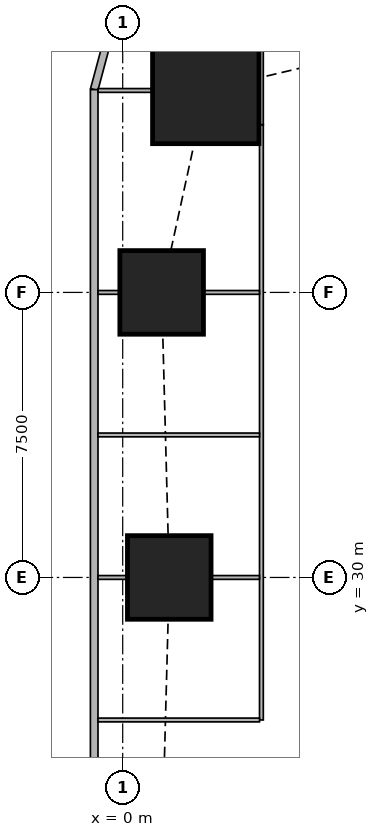
"""IFC4 building model, lengths in metres.
Left out: names, types, materials, properties, quantities, classifications, styles, units other than length and angle.
Written with IfcOpenShell. Run it as: python <this file> out.ifc"""

import sys

from ifc_helpers import new_model, si_unit, direction, frame, frame_2d, origin, origin_2d, place, context, subcontext, project, spatial, rectangle, extrude, element, fill, save


model = new_model("IFC4")
c1 = context("Model", 3, precision=1e-05, world=origin(), true_north=direction((0.0, 1.0)))
c2 = subcontext(c1, "Body", "Model", "MODEL_VIEW")
j1 = project(units=[si_unit("LENGTHUNIT", "METRE"), si_unit("PLANEANGLEUNIT", "RADIAN")], contexts=[c1])
p1 = place(None, origin())
s1 = spatial("IfcSite", under=j1, at=p1, CompositionType="ELEMENT")
p2 = place(p1, origin())
s2 = spatial("IfcBuilding", under=s1, at=p2, CompositionType="ELEMENT")
p3 = place(p2, frame((0.0, 0.0, 111.65)))
s3 = spatial("IfcBuildingStorey", under=s2, at=p3, CompositionType="ELEMENT", Elevation=111.65)
for number, where, z_axis, x_axis in (
    (1, (1.225, 30.0, 0.0), (0.0, 0.0, 1.0), (1.0, 0.0, 0.0)),
    (2, (1.025, 37.5, 0.0), (0.0, 0.0, 1.0), (1.0, 0.0, 0.0)),
):
    element("IfcColumn", number, at=place(p3, frame(where, z_axis=z_axis, x_axis=x_axis)), inside=s3, PredefinedType="COLUMN", context=c2, shape_type="SweptSolid", body=[
        extrude(rectangle(XDim=2.2, YDim=2.2, at=origin_2d()), origin(), (0.0, 0.0, 1.0), 3.75),
    ])
p4 = place(p3, frame((2.186, 42.814, 0.0), z_axis=(0.0, 0.0, 1.0), x_axis=(1.0, 0.0, 0.0)))
e3 = element("IfcColumn", 3, at=p4, inside=s3, PredefinedType="COLUMN", context=c2, shape_type="SweptSolid", body=[
    extrude(rectangle(XDim=2.8, YDim=2.8, at=origin_2d()), origin(), (0.0, 0.0, 1.0), 3.75),
])
p5 = place(p3, frame((-0.358, 44.298, 0.0), z_axis=(0.0, 0.0, 1.0), x_axis=(-0.259168954497, -0.965832000415, 0.0)))
e4 = element("IfcWall", 4, at=p5, inside=s3, PredefinedType="SOLIDWALL", context=c2, shape_type="SweptSolid", body=[
    extrude(rectangle(XDim=1.513, YDim=0.2, at=frame_2d((0.756, 0.0))), origin(), (0.0, 0.0, 1.0), 3.5),
])
p6 = place(p3, frame((-0.75, 42.837, 0.0), z_axis=(0.0, 0.0, 1.0), x_axis=(0.0, -1.0, 0.0)))
e5 = element("IfcWall", 5, at=p6, inside=s3, PredefinedType="SOLIDWALL", context=c2, shape_type="SweptSolid", body=[
    extrude(rectangle(XDim=40.674, YDim=0.2, at=frame_2d((20.337, 0.0))), origin(), (0.0, 0.0, 1.0), 3.5),
])
p7 = place(p6, frame((1.78, 0.0, 0.9)))
e6 = element("IfcOpeningElement", 6, at=p7, cuts=e5, PredefinedType="OPENING", context=c2, shape_type="SweptSolid", body=[
    extrude(rectangle(XDim=1.8, YDim=1.5, at=frame_2d((0.9, 0.75))), frame((0.0, 0.11, 0.0), z_axis=(0.0, -1.0, 0.0), x_axis=(1.0, 0.0, 0.0)), (0.0, 0.0, 1.0), 0.22),
])
p8 = place(p6, frame((6.312, 0.0, 0.9)))
e7 = element("IfcOpeningElement", 7, at=p8, cuts=e5, PredefinedType="OPENING", context=c2, shape_type="SweptSolid", body=[
    extrude(rectangle(XDim=1.8, YDim=1.5, at=frame_2d((0.9, 0.75))), frame((0.0, 0.11, 0.0), z_axis=(0.0, -1.0, 0.0), x_axis=(1.0, 0.0, 0.0)), (0.0, 0.0, 1.0), 0.22),
])
p9 = place(p6, frame((10.062, 0.0, 0.9)))
e8 = element("IfcOpeningElement", 8, at=p9, cuts=e5, PredefinedType="OPENING", context=c2, shape_type="SweptSolid", body=[
    extrude(rectangle(XDim=1.8, YDim=1.5, at=frame_2d((0.9, 0.75))), frame((0.0, 0.11, 0.0), z_axis=(0.0, -1.0, 0.0), x_axis=(1.0, 0.0, 0.0)), (0.0, 0.0, 1.0), 0.22),
])
p10 = place(p6, frame((13.812, 0.0, 0.9)))
e9 = element("IfcOpeningElement", 9, at=p10, cuts=e5, PredefinedType="OPENING", context=c2, shape_type="SweptSolid", body=[
    extrude(rectangle(XDim=1.8, YDim=1.5, at=frame_2d((0.9, 0.75))), frame((0.0, 0.11, 0.0), z_axis=(0.0, -1.0, 0.0), x_axis=(1.0, 0.0, 0.0)), (0.0, 0.0, 1.0), 0.22),
])
p11 = place(p6, frame((17.562, 0.0, 0.9)))
e10 = element("IfcOpeningElement", 10, at=p11, cuts=e5, PredefinedType="OPENING", context=c2, shape_type="SweptSolid", body=[
    extrude(rectangle(XDim=1.8, YDim=1.5, at=frame_2d((0.9, 0.75))), frame((0.0, 0.11, 0.0), z_axis=(0.0, -1.0, 0.0), x_axis=(1.0, 0.0, 0.0)), (0.0, 0.0, 1.0), 0.22),
])
p12 = place(p6, frame((21.312, 0.0, 0.9)))
e11 = element("IfcOpeningElement", 11, at=p12, cuts=e5, PredefinedType="OPENING", context=c2, shape_type="SweptSolid", body=[
    extrude(rectangle(XDim=1.8, YDim=1.5, at=frame_2d((0.9, 0.75))), frame((0.0, 0.11, 0.0), z_axis=(0.0, -1.0, 0.0), x_axis=(1.0, 0.0, 0.0)), (0.0, 0.0, 1.0), 0.22),
])
p13 = place(p6, frame((25.062, 0.0, 0.9)))
e12 = element("IfcOpeningElement", 12, at=p13, cuts=e5, PredefinedType="OPENING", context=c2, shape_type="SweptSolid", body=[
    extrude(rectangle(XDim=1.8, YDim=1.5, at=frame_2d((0.9, 0.75))), frame((0.0, 0.11, 0.0), z_axis=(0.0, -1.0, 0.0), x_axis=(1.0, 0.0, 0.0)), (0.0, 0.0, 1.0), 0.22),
])
p14 = place(p6, frame((28.812, 0.0, 0.9)))
e13 = element("IfcOpeningElement", 13, at=p14, cuts=e5, PredefinedType="OPENING", context=c2, shape_type="SweptSolid", body=[
    extrude(rectangle(XDim=1.8, YDim=1.5, at=frame_2d((0.9, 0.75))), frame((0.0, 0.11, 0.0), z_axis=(0.0, -1.0, 0.0), x_axis=(1.0, 0.0, 0.0)), (0.0, 0.0, 1.0), 0.22),
])
p15 = place(p6, frame((32.562, 0.0, 0.9)))
e14 = element("IfcOpeningElement", 14, at=p15, cuts=e5, PredefinedType="OPENING", context=c2, shape_type="SweptSolid", body=[
    extrude(rectangle(XDim=1.8, YDim=1.5, at=frame_2d((0.9, 0.75))), frame((0.0, 0.11, 0.0), z_axis=(0.0, -1.0, 0.0), x_axis=(1.0, 0.0, 0.0)), (0.0, 0.0, 1.0), 0.22),
])
p16 = place(p6, frame((37.094, 0.0, 0.9)))
e15 = element("IfcOpeningElement", 15, at=p16, cuts=e5, PredefinedType="OPENING", context=c2, shape_type="SweptSolid", body=[
    extrude(rectangle(XDim=1.8, YDim=1.5, at=frame_2d((0.9, 0.75))), frame((0.0, 0.11, 0.0), z_axis=(0.0, -1.0, 0.0), x_axis=(1.0, 0.0, 0.0)), (0.0, 0.0, 1.0), 0.22),
])
p17 = place(p3, frame((3.65, 26.25, 0.0), z_axis=(0.0, 0.0, 1.0), x_axis=(0.0, 1.0, 0.0)))
e16 = element("IfcWall", 16, at=p17, inside=s3, PredefinedType="PARTITIONING", context=c2, shape_type="SweptSolid", body=[
    extrude(rectangle(XDim=15.665, YDim=0.1, at=frame_2d((7.833, 0.0))), origin(), (0.0, 0.0, 1.0), 3.5),
])
p18 = place(p17, frame((1.449, 0.0, 0.0)))
e17 = element("IfcOpeningElement", 17, at=p18, cuts=e16, PredefinedType="OPENING", context=c2, shape_type="SweptSolid", body=[
    extrude(rectangle(XDim=0.9, YDim=2.1, at=frame_2d((0.45, 1.05))), frame((0.0, 0.06, 0.0), z_axis=(0.0, -1.0, 0.0), x_axis=(1.0, 0.0, 0.0)), (0.0, 0.0, 1.0), 0.12),
])
p19 = place(p17, frame((3.95, 0.0, 0.0)))
e18 = element("IfcOpeningElement", 18, at=p19, cuts=e16, PredefinedType="OPENING", context=c2, shape_type="SweptSolid", body=[
    extrude(rectangle(XDim=0.9, YDim=2.1, at=frame_2d((0.45, 1.05))), frame((0.0, 0.06, 0.0), z_axis=(0.0, -1.0, 0.0), x_axis=(1.0, 0.0, 0.0)), (0.0, 0.0, 1.0), 0.12),
])
p20 = place(p17, frame((7.7, 0.0, 0.0)))
e19 = element("IfcOpeningElement", 19, at=p20, cuts=e16, PredefinedType="OPENING", context=c2, shape_type="SweptSolid", body=[
    extrude(rectangle(XDim=0.9, YDim=2.1, at=frame_2d((0.45, 1.05))), frame((0.0, 0.06, 0.0), z_axis=(0.0, -1.0, 0.0), x_axis=(1.0, 0.0, 0.0)), (0.0, 0.0, 1.0), 0.12),
])
p21 = place(p17, frame((11.45, 0.0, 0.0)))
e20 = element("IfcOpeningElement", 20, at=p21, cuts=e16, PredefinedType="OPENING", context=c2, shape_type="SweptSolid", body=[
    extrude(rectangle(XDim=0.9, YDim=2.1, at=frame_2d((0.45, 1.05))), frame((0.0, 0.06, 0.0), z_axis=(0.0, -1.0, 0.0), x_axis=(1.0, 0.0, 0.0)), (0.0, 0.0, 1.0), 0.12),
])
p22 = place(p3, frame((3.65, 41.915, 0.0), z_axis=(0.0, 0.0, 1.0), x_axis=(0.0, 1.0, 0.0)))
e21 = element("IfcWall", 21, at=p22, inside=s3, PredefinedType="PARTITIONING", context=c2, shape_type="SweptSolid", body=[
    extrude(rectangle(XDim=2.49, YDim=0.1, at=frame_2d((1.245, 0.0))), origin(), (0.0, 0.0, 1.0), 2.05),
])
p23 = place(p3, frame((-0.65, 26.25, 0.0), z_axis=(0.0, 0.0, 1.0), x_axis=(1.0, 0.0, 0.0)))
e22 = element("IfcWall", 22, at=p23, inside=s3, PredefinedType="PARTITIONING", context=c2, shape_type="SweptSolid", body=[
    extrude(rectangle(XDim=4.25, YDim=0.1, at=frame_2d((2.125, 0.0))), origin(), (0.0, 0.0, 1.0), 2.2),
])
p24 = place(p3, frame((-0.65, 30.0, 0.0), z_axis=(0.0, 0.0, 1.0), x_axis=(1.0, 0.0, 0.0)))
e23 = element("IfcWall", 23, at=p24, inside=s3, PredefinedType="PARTITIONING", context=c2, shape_type="SweptSolid", body=[
    extrude(rectangle(XDim=0.774, YDim=0.1, at=frame_2d((0.387, 0.0))), origin(), (0.0, 0.0, 1.0), 3.5),
])
p25 = place(p3, frame((2.326, 30.0, 0.0), z_axis=(0.0, 0.0, 1.0), x_axis=(1.0, 0.0, 0.0)))
e24 = element("IfcWall", 24, at=p25, inside=s3, PredefinedType="PARTITIONING", context=c2, shape_type="SweptSolid", body=[
    extrude(rectangle(XDim=1.274, YDim=0.1, at=frame_2d((0.637, 0.0))), origin(), (0.0, 0.0, 1.0), 3.5),
])
p26 = place(p3, frame((-0.65, 33.75, 0.0), z_axis=(0.0, 0.0, 1.0), x_axis=(1.0, 0.0, 0.0)))
e25 = element("IfcWall", 25, at=p26, inside=s3, PredefinedType="PARTITIONING", context=c2, shape_type="SweptSolid", body=[
    extrude(rectangle(XDim=4.25, YDim=0.1, at=frame_2d((2.125, 0.0))), origin(), (0.0, 0.0, 1.0), 2.2),
])
p27 = place(p3, frame((-0.65, 37.5, 0.0), z_axis=(0.0, 0.0, 1.0), x_axis=(1.0, 0.0, 0.0)))
e26 = element("IfcWall", 26, at=p27, inside=s3, PredefinedType="PARTITIONING", context=c2, shape_type="SweptSolid", body=[
    extrude(rectangle(XDim=0.574, YDim=0.1, at=frame_2d((0.287, 0.0))), origin(), (0.0, 0.0, 1.0), 2.05),
])
p28 = place(p3, frame((2.126, 37.5, 0.0), z_axis=(0.0, 0.0, 1.0), x_axis=(1.0, 0.0, 0.0)))
e27 = element("IfcWall", 27, at=p28, inside=s3, PredefinedType="PARTITIONING", context=c2, shape_type="SweptSolid", body=[
    extrude(rectangle(XDim=1.474, YDim=0.1, at=frame_2d((0.737, 0.0))), origin(), (0.0, 0.0, 1.0), 2.05),
])
p29 = place(p3, frame((-0.65, 42.814, 0.0), z_axis=(0.0, 0.0, 1.0), x_axis=(1.0, 0.0, 0.0)))
e28 = element("IfcWall", 28, at=p29, inside=s3, PredefinedType="PARTITIONING", context=c2, shape_type="SweptSolid", body=[
    extrude(rectangle(XDim=1.435, YDim=0.1, at=frame_2d((0.717, 0.0))), origin(), (0.0, 0.0, 1.0), 3.5),
])
p30 = place(p7, origin())
e29 = element("IfcWindow", 29, at=p30, inside=s3, PartitioningType="SINGLE_PANEL", PredefinedType="WINDOW", context=c2, shape_type="SweptSolid", body=[
    extrude(rectangle(XDim=1.8, YDim=1.5, at=frame_2d((0.9, 0.75))), frame((0.0, 0.03, 0.0), z_axis=(0.0, -1.0, 0.0), x_axis=(1.0, 0.0, 0.0)), (0.0, 0.0, 1.0), 0.06),
])
fill(e6, e29)
p31 = place(p8, origin())
e30 = element("IfcWindow", 30, at=p31, inside=s3, PartitioningType="SINGLE_PANEL", PredefinedType="WINDOW", context=c2, shape_type="SweptSolid", body=[
    extrude(rectangle(XDim=1.8, YDim=1.5, at=frame_2d((0.9, 0.75))), frame((0.0, 0.03, 0.0), z_axis=(0.0, -1.0, 0.0), x_axis=(1.0, 0.0, 0.0)), (0.0, 0.0, 1.0), 0.06),
])
fill(e7, e30)
p32 = place(p9, origin())
e31 = element("IfcWindow", 31, at=p32, inside=s3, PartitioningType="SINGLE_PANEL", PredefinedType="WINDOW", context=c2, shape_type="SweptSolid", body=[
    extrude(rectangle(XDim=1.8, YDim=1.5, at=frame_2d((0.9, 0.75))), frame((0.0, 0.03, 0.0), z_axis=(0.0, -1.0, 0.0), x_axis=(1.0, 0.0, 0.0)), (0.0, 0.0, 1.0), 0.06),
])
fill(e8, e31)
p33 = place(p10, origin())
e32 = element("IfcWindow", 32, at=p33, inside=s3, PartitioningType="SINGLE_PANEL", PredefinedType="WINDOW", context=c2, shape_type="SweptSolid", body=[
    extrude(rectangle(XDim=1.8, YDim=1.5, at=frame_2d((0.9, 0.75))), frame((0.0, 0.03, 0.0), z_axis=(0.0, -1.0, 0.0), x_axis=(1.0, 0.0, 0.0)), (0.0, 0.0, 1.0), 0.06),
])
fill(e9, e32)
p34 = place(p11, origin())
e33 = element("IfcWindow", 33, at=p34, inside=s3, PartitioningType="SINGLE_PANEL", PredefinedType="WINDOW", context=c2, shape_type="SweptSolid", body=[
    extrude(rectangle(XDim=1.8, YDim=1.5, at=frame_2d((0.9, 0.75))), frame((0.0, 0.03, 0.0), z_axis=(0.0, -1.0, 0.0), x_axis=(1.0, 0.0, 0.0)), (0.0, 0.0, 1.0), 0.06),
])
fill(e10, e33)
p35 = place(p18, origin())
e34 = element("IfcDoor", 34, at=p35, inside=s3, OperationType="SINGLE_SWING_LEFT", PredefinedType="DOOR", context=c2, shape_type="SweptSolid", body=[
    extrude(rectangle(XDim=0.9, YDim=2.1, at=frame_2d((0.45, 1.05))), frame((0.0, 0.025, 0.0), z_axis=(0.0, -1.0, 0.0), x_axis=(1.0, 0.0, 0.0)), (0.0, 0.0, 1.0), 0.05),
])
fill(e17, e34)
p36 = place(p19, origin())
e35 = element("IfcDoor", 35, at=p36, inside=s3, OperationType="SINGLE_SWING_LEFT", PredefinedType="DOOR", context=c2, shape_type="SweptSolid", body=[
    extrude(rectangle(XDim=0.9, YDim=2.1, at=frame_2d((0.45, 1.05))), frame((0.0, 0.025, 0.0), z_axis=(0.0, -1.0, 0.0), x_axis=(1.0, 0.0, 0.0)), (0.0, 0.0, 1.0), 0.05),
])
fill(e18, e35)
p37 = place(p20, origin())
e36 = element("IfcDoor", 36, at=p37, inside=s3, OperationType="SINGLE_SWING_LEFT", PredefinedType="DOOR", context=c2, shape_type="SweptSolid", body=[
    extrude(rectangle(XDim=0.9, YDim=2.1, at=frame_2d((0.45, 1.05))), frame((0.0, 0.025, 0.0), z_axis=(0.0, -1.0, 0.0), x_axis=(1.0, 0.0, 0.0)), (0.0, 0.0, 1.0), 0.05),
])
fill(e19, e36)
p38 = place(p21, origin())
e37 = element("IfcDoor", 37, at=p38, inside=s3, OperationType="SINGLE_SWING_LEFT", PredefinedType="DOOR", context=c2, shape_type="SweptSolid", body=[
    extrude(rectangle(XDim=0.9, YDim=2.1, at=frame_2d((0.45, 1.05))), frame((0.0, 0.025, 0.0), z_axis=(0.0, -1.0, 0.0), x_axis=(1.0, 0.0, 0.0)), (0.0, 0.0, 1.0), 0.05),
])
fill(e20, e37)
save(model, sys.argv[1])
